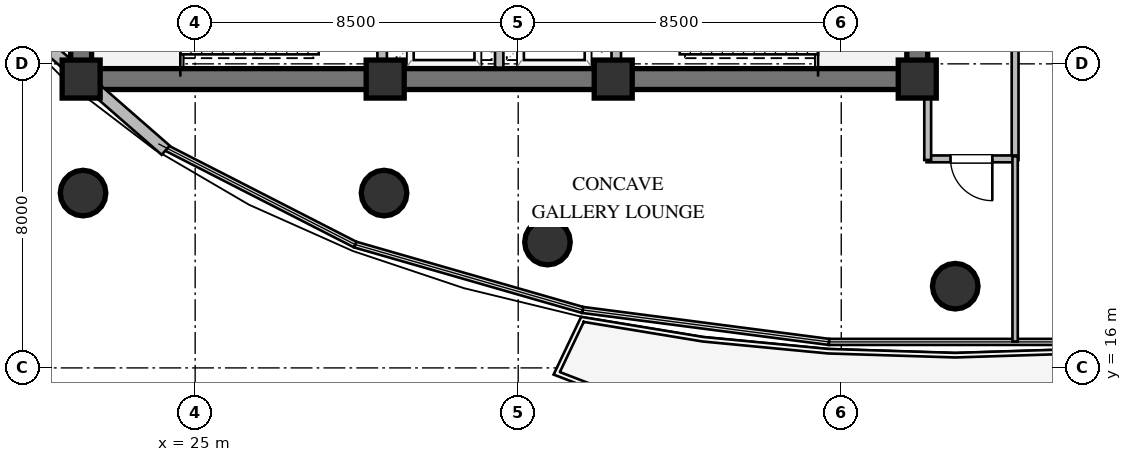
"""IFC4 building model, lengths in metres.
Left out: names, types, materials, properties, quantities, classifications, styles, units other than length and angle.
Written with IfcOpenShell. Run it as: python <this file> out.ifc"""

import sys

from ifc_helpers import new_model, si_unit, direction, frame, frame_2d, origin, origin_2d, place, context, subcontext, project, spatial, rectangle, circle, extrude, element, fill, save


model = new_model("IFC4")
c1 = context("Model", 3, precision=1e-05, world=origin(), true_north=direction((0.0, 1.0)))
c2 = subcontext(c1, "Body", "Model", "MODEL_VIEW")
j1 = project(units=[si_unit("LENGTHUNIT", "METRE"), si_unit("PLANEANGLEUNIT", "RADIAN")], contexts=[c1])
p1 = place(None, origin())
s1 = spatial("IfcSite", under=j1, at=p1, CompositionType="ELEMENT")
p2 = place(p1, origin())
s2 = spatial("IfcBuilding", under=s1, at=p2, CompositionType="ELEMENT")
p3 = place(p2, frame((0.0, 0.0, 97.8)))
s3 = spatial("IfcBuildingStorey", under=s2, at=p3, CompositionType="ELEMENT", Elevation=97.8)
p4 = place(p3, frame((21.725, 23.6, 0.0), z_axis=(0.0, 0.0, 1.0), x_axis=(1.0, 0.0, 0.0)))
e1 = element("IfcWall", 1, at=p4, inside=s3, PredefinedType="SHEAR", context=c2, shape_type="SweptSolid", body=[
    extrude(rectangle(XDim=22.55, YDim=0.55, at=frame_2d((11.275, 0.0))), origin(), (0.0, 0.0, 1.0), 4.56),
])
p5 = place(p3, frame((22.0, 23.875, 0.0), z_axis=(0.0, 0.0, 1.0), x_axis=(0.0, 1.0, 0.0)))
e2 = element("IfcWall", 2, at=p5, inside=s3, PredefinedType="SHEAR", context=c2, shape_type="SweptSolid", body=[
    extrude(rectangle(XDim=12.25, YDim=0.55, at=frame_2d((6.125, 0.0))), origin(), (0.0, 0.0, 1.0), 4.56),
])
p6 = place(p3, frame((44.0, 23.875, 0.0), z_axis=(0.0, 0.0, 1.0), x_axis=(0.0, 1.0, 0.0)))
e3 = element("IfcWall", 3, at=p6, inside=s3, PredefinedType="SHEAR", context=c2, shape_type="SweptSolid", body=[
    extrude(rectangle(XDim=12.25, YDim=0.55, at=frame_2d((6.125, 0.0))), origin(), (0.0, 0.0, 1.0), 4.56),
])
p7 = place(p6, frame((8.725, 0.0, 0.0)))
e4 = element("IfcOpeningElement", 4, at=p7, cuts=e3, PredefinedType="OPENING", context=c2, shape_type="SweptSolid", body=[
    extrude(rectangle(XDim=1.5, YDim=2.15, at=frame_2d((0.75, 1.075))), frame((0.0, 0.285, 0.0), z_axis=(0.0, -1.0, 0.0), x_axis=(1.0, 0.0, 0.0)), (0.0, 0.0, 1.0), 0.57),
])
for number, where, z_axis, x_axis in (
    (5, (22.0, 23.6, 0.0), (0.0, 0.0, 1.0), (1.0, 0.0, 0.0)),
    (6, (30.0, 23.6, 0.0), (0.0, 0.0, 1.0), (1.0, 0.0, 0.0)),
    (7, (36.0, 23.6, 0.0), (0.0, 0.0, 1.0), (1.0, 0.0, 0.0)),
    (8, (44.0, 23.6, 0.0), (0.0, 0.0, 1.0), (1.0, 0.0, 0.0)),
):
    element("IfcColumn", number, at=place(p3, frame(where, z_axis=z_axis, x_axis=x_axis)), inside=s3, PredefinedType="COLUMN", context=c2, shape_type="SweptSolid", body=[
        extrude(rectangle(XDim=1.0, YDim=1.0, at=origin_2d()), origin(), (0.0, 0.0, 1.0), 4.8),
    ])
for number, where, z_axis, x_axis in (
    (9, (22.05, 20.6, -0.32), (0.0, 0.0, 1.0), (1.0, 0.0, 0.0)),
    (10, (29.97, 20.6, -0.32), (0.0, 0.0, 1.0), (1.0, 0.0, 0.0)),
    (11, (34.27, 19.31, -0.32), (0.0, 0.0, 1.0), (1.0, 0.0, 0.0)),
    (12, (45.0, 18.15, -0.32), (0.0, 0.0, 1.0), (1.0, 0.0, 0.0)),
):
    element("IfcColumn", number, at=place(p3, frame(where, z_axis=z_axis, x_axis=x_axis)), inside=s3, PredefinedType="COLUMN", context=c2, shape_type="SweptSolid", body=[
        extrude(circle(Radius=0.6, at=origin_2d()), origin(), (0.0, 0.0, 1.0), 5.12),
    ])
p8 = place(p3, frame((24.225, 21.727, 0.0), z_axis=(0.0, 0.0, 1.0), x_axis=(-0.753105964003, 0.657899237713, 0.0)))
e13 = element("IfcWall", 13, at=p8, inside=s3, PredefinedType="STANDARD", context=c2, shape_type="SweptSolid", body=[
    extrude(rectangle(XDim=5.998, YDim=0.32, at=frame_2d((2.999, 0.0))), origin(), (0.0, 0.0, 1.0), 2.35),
])
p9 = place(p3, frame((29.92, 23.9, 0.0), z_axis=(0.0, 0.0, 1.0), x_axis=(0.0, 1.0, 0.0)))
e14 = element("IfcWall", 14, at=p9, inside=s3, PredefinedType="SOLIDWALL", context=c2, shape_type="SweptSolid", body=[
    extrude(rectangle(XDim=5.4, YDim=0.25, at=frame_2d((2.7, 0.0))), origin(), (0.0, 0.0, 1.0), 4.09),
])
p10 = place(p9, frame((3.421, 0.0, 0.0)))
e15 = element("IfcOpeningElement", 15, at=p10, cuts=e14, PredefinedType="OPENING", context=c2, shape_type="SweptSolid", body=[
    extrude(rectangle(XDim=1.15, YDim=2.1, at=frame_2d((0.575, 1.05))), frame((0.0, 0.135, 0.0), z_axis=(0.0, -1.0, 0.0), x_axis=(1.0, 0.0, 0.0)), (0.0, 0.0, 1.0), 0.27),
])
p11 = place(p3, frame((36.08, 23.9, 0.0), z_axis=(0.0, 0.0, 1.0), x_axis=(0.0, 1.0, 0.0)))
e16 = element("IfcWall", 16, at=p11, inside=s3, PredefinedType="SOLIDWALL", context=c2, shape_type="SweptSolid", body=[
    extrude(rectangle(XDim=5.4, YDim=0.25, at=frame_2d((2.7, 0.0))), origin(), (0.0, 0.0, 1.0), 4.56),
])
p12 = place(p11, frame((3.421, 0.0, 0.0)))
e17 = element("IfcOpeningElement", 17, at=p12, cuts=e16, PredefinedType="OPENING", context=c2, shape_type="SweptSolid", body=[
    extrude(rectangle(XDim=1.15, YDim=2.1, at=frame_2d((0.575, 1.05))), frame((0.0, 0.135, 0.0), z_axis=(0.0, -1.0, 0.0), x_axis=(1.0, 0.0, 0.0)), (0.0, 0.0, 1.0), 0.27),
])
p13 = place(p3, frame((33.0, 23.9, 0.0), z_axis=(0.0, 0.0, 1.0), x_axis=(0.0, 1.0, 0.0)))
e18 = element("IfcWall", 18, at=p13, inside=s3, PredefinedType="SOLIDWALL", context=c2, shape_type="SweptSolid", body=[
    extrude(rectangle(XDim=2.72, YDim=0.22, at=frame_2d((1.36, 0.0))), origin(), (0.0, 0.0, 1.0), 4.56),
])
p14 = place(p3, frame((46.575, 29.565, 0.0), z_axis=(0.0, 0.0, 1.0), x_axis=(0.0, -1.0, 0.0)))
e19 = element("IfcWall", 19, at=p14, inside=s3, PredefinedType="PARTITIONING", context=c2, shape_type="SweptSolid", body=[
    extrude(rectangle(XDim=8.095, YDim=0.18, at=frame_2d((4.047, 0.0))), origin(), (0.0, 0.0, 1.0), 4.56),
])
p15 = place(p14, frame((3.498, 0.0, 0.0)))
e20 = element("IfcOpeningElement", 20, at=p15, cuts=e19, PredefinedType="OPENING", context=c2, shape_type="SweptSolid", body=[
    extrude(rectangle(XDim=1.1, YDim=2.1, at=frame_2d((0.55, 1.05))), frame((0.0, 0.1, 0.0), z_axis=(0.0, -1.0, 0.0), x_axis=(1.0, 0.0, 0.0)), (0.0, 0.0, 1.0), 0.2),
])
p16 = place(p3, frame((46.605, 21.5, 0.0), z_axis=(0.0, 0.0, 1.0), x_axis=(-1.0, 0.0, 0.0)))
e21 = element("IfcWall", 21, at=p16, inside=s3, PredefinedType="PARTITIONING", context=c2, shape_type="SweptSolid", body=[
    extrude(rectangle(XDim=2.36, YDim=0.18, at=frame_2d((1.18, 0.0))), origin(), (0.0, 0.0, 1.0), 4.56),
])
p17 = place(p16, frame((0.63, 0.0, 0.0)))
e22 = element("IfcOpeningElement", 22, at=p17, cuts=e21, PredefinedType="OPENING", context=c2, shape_type="SweptSolid", body=[
    extrude(rectangle(XDim=1.1, YDim=2.1, at=frame_2d((0.55, 1.05))), frame((0.0, 0.1, 0.0), z_axis=(0.0, -1.0, 0.0), x_axis=(1.0, 0.0, 0.0)), (0.0, 0.0, 1.0), 0.2),
])
p18 = place(p3, frame((44.275, 21.47, 0.0), z_axis=(0.0, 0.0, 1.0), x_axis=(0.0, 1.0, 0.0)))
e23 = element("IfcWall", 23, at=p18, inside=s3, PredefinedType="PARTITIONING", context=c2, shape_type="SweptSolid", body=[
    extrude(rectangle(XDim=2.12, YDim=0.18, at=frame_2d((1.06, 0.0))), origin(), (0.0, 0.0, 1.0), 3.7),
])
p19 = place(p3, frame((46.575, 16.694, 0.0), z_axis=(0.0, 0.0, 1.0), x_axis=(0.0, 1.0, 0.0)))
e24 = element("IfcWall", 24, at=p19, inside=s3, PredefinedType="PARTITIONING", context=c2, shape_type="SweptSolid", body=[
    extrude(rectangle(XDim=4.871, YDim=0.14, at=frame_2d((2.436, 0.0))), origin(), (0.0, 0.0, 1.0), 4.56),
])
p20 = place(p17, origin())
e25 = element("IfcDoor", 25, at=p20, inside=s3, OperationType="SINGLE_SWING_LEFT", PredefinedType="DOOR", context=c2, shape_type="SweptSolid", body=[
    extrude(rectangle(XDim=1.1, YDim=2.1, at=frame_2d((0.55, 1.05))), frame((0.0, 0.025, 0.0), z_axis=(0.0, -1.0, 0.0), x_axis=(1.0, 0.0, 0.0)), (0.0, 0.0, 1.0), 0.05),
])
fill(e22, e25)
save(model, sys.argv[1])
